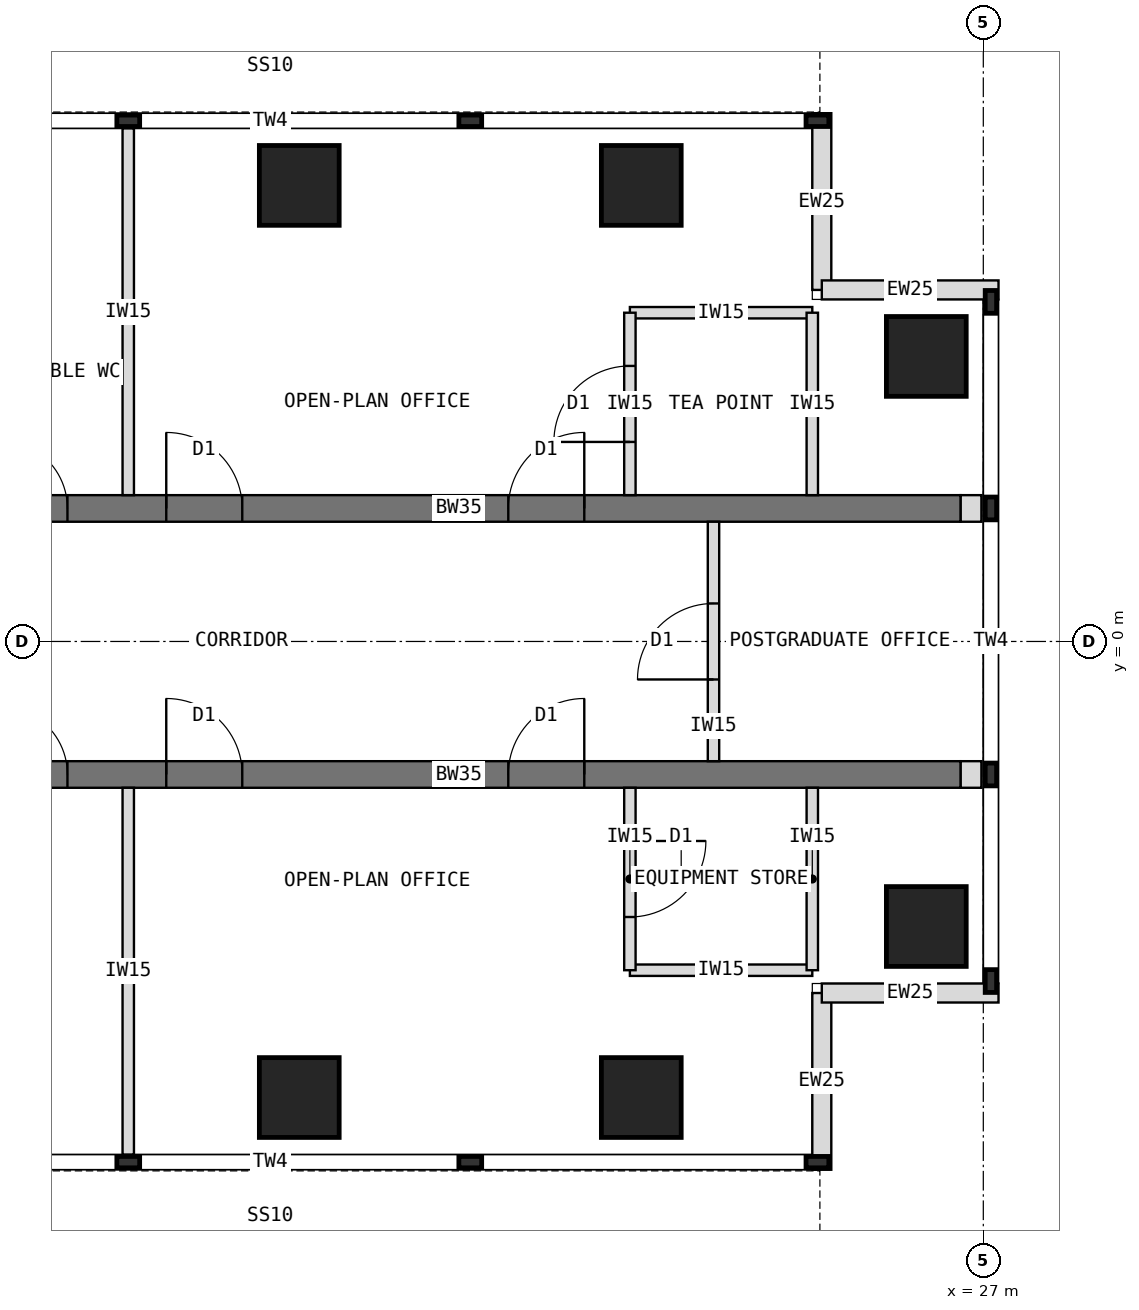
"""IFC4 building model, lengths in metres.
Left out: names, types, materials, properties, quantities, classifications, styles, units other than length and angle.
Written with IfcOpenShell. Run it as: python <this file> out.ifc"""

import sys

from ifc_helpers import new_model, si_unit, direction, frame, frame_2d, origin, origin_2d, place, context, subcontext, project, spatial, rectangle, extrude, element, fill, save


model = new_model("IFC4")
c1 = context("Model", 3, precision=1e-05, world=origin(), true_north=direction((0.0, 1.0)))
c2 = subcontext(c1, "Body", "Model", "MODEL_VIEW")
j1 = project(units=[si_unit("LENGTHUNIT", "METRE"), si_unit("PLANEANGLEUNIT", "RADIAN")], contexts=[c1])
p1 = place(None, origin())
s1 = spatial("IfcSite", under=j1, at=p1, CompositionType="ELEMENT")
p2 = place(p1, origin())
s2 = spatial("IfcBuilding", under=s1, at=p2, CompositionType="ELEMENT")
p3 = place(p2, frame((0.0, 0.0, 251.5)))
s3 = spatial("IfcBuildingStorey", under=s2, at=p3, CompositionType="ELEMENT", Elevation=251.5)
p4 = place(p3, frame((13.5, 1.75, 0.0), z_axis=(0.0, 0.0, 1.0), x_axis=(1.0, 0.0, 0.0)))
e1 = element("IfcWall", 1, at=p4, inside=s3, PredefinedType="SHEAR", context=c2, shape_type="SweptSolid", body=[
    extrude(rectangle(XDim=13.2, YDim=0.35, at=frame_2d((6.6, 0.0))), origin(), (0.0, 0.0, 1.0), 4.0),
])
p5 = place(p4, frame((0.55, 0.0, 0.0)))
e2 = element("IfcOpeningElement", 2, at=p5, cuts=e1, PredefinedType="OPENING", context=c2, shape_type="SweptSolid", body=[
    extrude(rectangle(XDim=0.9, YDim=2.1, at=frame_2d((0.45, 1.05))), frame((0.0, 0.185, 0.0), z_axis=(0.0, -1.0, 0.0), x_axis=(1.0, 0.0, 0.0)), (0.0, 0.0, 1.0), 0.37),
])
p6 = place(p4, frame((2.75, 0.0, 0.0)))
e3 = element("IfcOpeningElement", 3, at=p6, cuts=e1, PredefinedType="OPENING", context=c2, shape_type="SweptSolid", body=[
    extrude(rectangle(XDim=1.0, YDim=2.1, at=frame_2d((0.5, 1.05))), frame((0.0, 0.185, 0.0), z_axis=(0.0, -1.0, 0.0), x_axis=(1.0, 0.0, 0.0)), (0.0, 0.0, 1.0), 0.37),
])
p7 = place(p4, frame((7.25, 0.0, 0.0)))
e4 = element("IfcOpeningElement", 4, at=p7, cuts=e1, PredefinedType="OPENING", context=c2, shape_type="SweptSolid", body=[
    extrude(rectangle(XDim=1.0, YDim=2.1, at=frame_2d((0.5, 1.05))), frame((0.0, 0.185, 0.0), z_axis=(0.0, -1.0, 0.0), x_axis=(1.0, 0.0, 0.0)), (0.0, 0.0, 1.0), 0.37),
])
p8 = place(p3, frame((13.5, -1.75, 0.0), z_axis=(0.0, 0.0, 1.0), x_axis=(1.0, 0.0, 0.0)))
e5 = element("IfcWall", 5, at=p8, inside=s3, PredefinedType="SHEAR", context=c2, shape_type="SweptSolid", body=[
    extrude(rectangle(XDim=13.2, YDim=0.35, at=frame_2d((6.6, 0.0))), origin(), (0.0, 0.0, 1.0), 4.0),
])
p9 = place(p8, frame((0.55, 0.0, 0.0)))
e6 = element("IfcOpeningElement", 6, at=p9, cuts=e5, PredefinedType="OPENING", context=c2, shape_type="SweptSolid", body=[
    extrude(rectangle(XDim=0.9, YDim=2.1, at=frame_2d((0.45, 1.05))), frame((0.0, 0.185, 0.0), z_axis=(0.0, -1.0, 0.0), x_axis=(1.0, 0.0, 0.0)), (0.0, 0.0, 1.0), 0.37),
])
p10 = place(p8, frame((2.75, 0.0, 0.0)))
e7 = element("IfcOpeningElement", 7, at=p10, cuts=e5, PredefinedType="OPENING", context=c2, shape_type="SweptSolid", body=[
    extrude(rectangle(XDim=1.0, YDim=2.1, at=frame_2d((0.5, 1.05))), frame((0.0, 0.185, 0.0), z_axis=(0.0, -1.0, 0.0), x_axis=(1.0, 0.0, 0.0)), (0.0, 0.0, 1.0), 0.37),
])
p11 = place(p8, frame((7.25, 0.0, 0.0)))
e8 = element("IfcOpeningElement", 8, at=p11, cuts=e5, PredefinedType="OPENING", context=c2, shape_type="SweptSolid", body=[
    extrude(rectangle(XDim=1.0, YDim=2.1, at=frame_2d((0.5, 1.05))), frame((0.0, 0.185, 0.0), z_axis=(0.0, -1.0, 0.0), x_axis=(1.0, 0.0, 0.0)), (0.0, 0.0, 1.0), 0.37),
])
for number, where, z_axis, x_axis in (
    (9, (18.0, 6.0, 0.0), (0.0, 0.0, 1.0), (1.0, 0.0, 0.0)),
    (10, (18.0, -6.0, 0.0), (0.0, 0.0, 1.0), (1.0, 0.0, 0.0)),
    (11, (22.5, 6.0, 0.0), (0.0, 0.0, 1.0), (1.0, 0.0, 0.0)),
    (12, (22.5, -6.0, 0.0), (0.0, 0.0, 1.0), (1.0, 0.0, 0.0)),
    (13, (26.25, 3.75, 0.0), (0.0, 0.0, 1.0), (1.0, 0.0, 0.0)),
    (14, (26.25, -3.75, 0.0), (0.0, 0.0, 1.0), (1.0, 0.0, 0.0)),
):
    element("IfcColumn", number, at=place(p3, frame(where, z_axis=z_axis, x_axis=x_axis)), inside=s3, PredefinedType="COLUMN", context=c2, shape_type="SweptSolid", body=[
        extrude(rectangle(XDim=1.05, YDim=1.05, at=origin_2d()), origin(), (0.0, 0.0, 1.0), 4.0),
    ])
for number, where, z_axis, x_axis in (
    (15, (24.875, 6.95, 0.0), (0.0, 0.0, 1.0), (0.0, -1.0, 0.0)),
    (16, (24.875, 4.625, 0.0), (0.0, 0.0, 1.0), (1.0, 0.0, 0.0)),
    (17, (24.875, -6.95, 0.0), (0.0, 0.0, 1.0), (0.0, 1.0, 0.0)),
    (18, (24.875, -4.625, 0.0), (0.0, 0.0, 1.0), (1.0, 0.0, 0.0)),
):
    element("IfcWall", number, at=place(p3, frame(where, z_axis=z_axis, x_axis=x_axis)), inside=s3, PredefinedType="STANDARD", context=c2, shape_type="SweptSolid", body=[
        extrude(rectangle(XDim=2.325, YDim=0.25, at=frame_2d((1.163, 0.0))), origin(), (0.0, 0.0, 1.0), 3.8),
    ])
for number, where, z_axis, x_axis in (
    (19, (26.7, 1.75, 0.0), (0.0, 0.0, 1.0), (1.0, 0.0, 0.0)),
    (20, (26.7, -1.75, 0.0), (0.0, 0.0, 1.0), (1.0, 0.0, 0.0)),
):
    element("IfcWall", number, at=place(p3, frame(where, z_axis=z_axis, x_axis=x_axis)), inside=s3, PredefinedType="PARTITIONING", context=c2, shape_type="SweptSolid", body=[
        extrude(rectangle(XDim=0.275, YDim=0.35, at=frame_2d((0.138, 0.0))), origin(), (0.0, 0.0, 1.0), 3.8),
    ])
p12 = place(p3, frame((15.75, 1.925, 0.0), z_axis=(0.0, 0.0, 1.0), x_axis=(0.0, 1.0, 0.0)))
e21 = element("IfcWall", 21, at=p12, inside=s3, PredefinedType="PARTITIONING", context=c2, shape_type="SweptSolid", body=[
    extrude(rectangle(XDim=4.825, YDim=0.15, at=frame_2d((2.413, 0.0))), origin(), (0.0, 0.0, 1.0), 3.8),
])
p13 = place(p3, frame((22.35, 4.325, 0.0), z_axis=(0.0, 0.0, 1.0), x_axis=(1.0, 0.0, 0.0)))
e22 = element("IfcWall", 22, at=p13, inside=s3, PredefinedType="PARTITIONING", context=c2, shape_type="SweptSolid", body=[
    extrude(rectangle(XDim=2.4, YDim=0.15, at=frame_2d((1.2, 0.0))), origin(), (0.0, 0.0, 1.0), 3.8),
])
p14 = place(p3, frame((22.35, 1.925, 0.0), z_axis=(0.0, 0.0, 1.0), x_axis=(0.0, 1.0, 0.0)))
e23 = element("IfcWall", 23, at=p14, inside=s3, PredefinedType="PARTITIONING", context=c2, shape_type="SweptSolid", body=[
    extrude(rectangle(XDim=2.4, YDim=0.15, at=frame_2d((1.2, 0.0))), origin(), (0.0, 0.0, 1.0), 3.8),
])
p15 = place(p14, frame((0.7, 0.0, 0.0)))
e24 = element("IfcOpeningElement", 24, at=p15, cuts=e23, PredefinedType="OPENING", context=c2, shape_type="SweptSolid", body=[
    extrude(rectangle(XDim=1.0, YDim=2.1, at=frame_2d((0.5, 1.05))), frame((0.0, 0.085, 0.0), z_axis=(0.0, -1.0, 0.0), x_axis=(1.0, 0.0, 0.0)), (0.0, 0.0, 1.0), 0.17),
])
p16 = place(p3, frame((24.75, 1.925, 0.0), z_axis=(0.0, 0.0, 1.0), x_axis=(0.0, 1.0, 0.0)))
e25 = element("IfcWall", 25, at=p16, inside=s3, PredefinedType="PARTITIONING", context=c2, shape_type="SweptSolid", body=[
    extrude(rectangle(XDim=2.4, YDim=0.15, at=frame_2d((1.2, 0.0))), origin(), (0.0, 0.0, 1.0), 3.8),
])
p17 = place(p3, frame((15.75, -1.925, 0.0), z_axis=(0.0, 0.0, 1.0), x_axis=(0.0, -1.0, 0.0)))
e26 = element("IfcWall", 26, at=p17, inside=s3, PredefinedType="PARTITIONING", context=c2, shape_type="SweptSolid", body=[
    extrude(rectangle(XDim=4.825, YDim=0.15, at=frame_2d((2.413, 0.0))), origin(), (0.0, 0.0, 1.0), 3.8),
])
p18 = place(p3, frame((22.35, -4.325, 0.0), z_axis=(0.0, 0.0, 1.0), x_axis=(1.0, 0.0, 0.0)))
e27 = element("IfcWall", 27, at=p18, inside=s3, PredefinedType="PARTITIONING", context=c2, shape_type="SweptSolid", body=[
    extrude(rectangle(XDim=2.4, YDim=0.15, at=frame_2d((1.2, 0.0))), origin(), (0.0, 0.0, 1.0), 3.8),
])
p19 = place(p3, frame((22.35, -1.925, 0.0), z_axis=(0.0, 0.0, 1.0), x_axis=(0.0, -1.0, 0.0)))
e28 = element("IfcWall", 28, at=p19, inside=s3, PredefinedType="PARTITIONING", context=c2, shape_type="SweptSolid", body=[
    extrude(rectangle(XDim=2.4, YDim=0.15, at=frame_2d((1.2, 0.0))), origin(), (0.0, 0.0, 1.0), 3.8),
])
p20 = place(p19, frame((0.7, 0.0, 0.0)))
e29 = element("IfcOpeningElement", 29, at=p20, cuts=e28, PredefinedType="OPENING", context=c2, shape_type="SweptSolid", body=[
    extrude(rectangle(XDim=1.0, YDim=2.1, at=frame_2d((0.5, 1.05))), frame((0.0, 0.085, 0.0), z_axis=(0.0, -1.0, 0.0), x_axis=(1.0, 0.0, 0.0)), (0.0, 0.0, 1.0), 0.17),
])
p21 = place(p3, frame((24.75, -1.925, 0.0), z_axis=(0.0, 0.0, 1.0), x_axis=(0.0, -1.0, 0.0)))
e30 = element("IfcWall", 30, at=p21, inside=s3, PredefinedType="PARTITIONING", context=c2, shape_type="SweptSolid", body=[
    extrude(rectangle(XDim=2.4, YDim=0.15, at=frame_2d((1.2, 0.0))), origin(), (0.0, 0.0, 1.0), 3.8),
])
p22 = place(p3, frame((23.45, -1.575, 0.0), z_axis=(0.0, 0.0, 1.0), x_axis=(0.0, 1.0, 0.0)))
e31 = element("IfcWall", 31, at=p22, inside=s3, PredefinedType="PARTITIONING", context=c2, shape_type="SweptSolid", body=[
    extrude(rectangle(XDim=3.15, YDim=0.15, at=frame_2d((1.575, 0.0))), origin(), (0.0, 0.0, 1.0), 3.8),
])
p23 = place(p22, frame((1.075, 0.0, 0.0)))
e32 = element("IfcOpeningElement", 32, at=p23, cuts=e31, PredefinedType="OPENING", context=c2, shape_type="SweptSolid", body=[
    extrude(rectangle(XDim=1.0, YDim=2.1, at=frame_2d((0.5, 1.05))), frame((0.0, 0.085, 0.0), z_axis=(0.0, -1.0, 0.0), x_axis=(1.0, 0.0, 0.0)), (0.0, 0.0, 1.0), 0.17),
])
p24 = place(p15, origin())
e33 = element("IfcDoor", 33, at=p24, inside=s3, OperationType="SINGLE_SWING_LEFT", PredefinedType="DOOR", context=c2, shape_type="SweptSolid", body=[
    extrude(rectangle(XDim=1.0, YDim=2.1, at=frame_2d((0.5, 1.05))), frame((0.0, 0.025, 0.0), z_axis=(0.0, -1.0, 0.0), x_axis=(1.0, 0.0, 0.0)), (0.0, 0.0, 1.0), 0.05),
])
fill(e24, e33)
p25 = place(p20, origin())
e34 = element("IfcDoor", 34, at=p25, inside=s3, OperationType="SINGLE_SWING_LEFT", PredefinedType="DOOR", context=c2, shape_type="SweptSolid", body=[
    extrude(rectangle(XDim=1.0, YDim=2.1, at=frame_2d((0.5, 1.05))), frame((0.0, 0.025, 0.0), z_axis=(0.0, -1.0, 0.0), x_axis=(1.0, 0.0, 0.0)), (0.0, 0.0, 1.0), 0.05),
])
fill(e29, e34)
p26 = place(p23, origin())
e35 = element("IfcDoor", 35, at=p26, inside=s3, OperationType="SINGLE_SWING_LEFT", PredefinedType="DOOR", context=c2, shape_type="SweptSolid", body=[
    extrude(rectangle(XDim=1.0, YDim=2.1, at=frame_2d((0.5, 1.05))), frame((0.0, 0.025, 0.0), z_axis=(0.0, -1.0, 0.0), x_axis=(1.0, 0.0, 0.0)), (0.0, 0.0, 1.0), 0.05),
])
fill(e32, e35)
p27 = place(p5, origin())
e36 = element("IfcDoor", 36, at=p27, inside=s3, OperationType="SINGLE_SWING_LEFT", PredefinedType="DOOR", context=c2, shape_type="SweptSolid", body=[
    extrude(rectangle(XDim=0.9, YDim=2.1, at=frame_2d((0.45, 1.05))), frame((0.0, 0.025, 0.0), z_axis=(0.0, -1.0, 0.0), x_axis=(1.0, 0.0, 0.0)), (0.0, 0.0, 1.0), 0.05),
])
fill(e2, e36)
p28 = place(p6, origin())
e37 = element("IfcDoor", 37, at=p28, inside=s3, OperationType="SINGLE_SWING_LEFT", PredefinedType="DOOR", context=c2, shape_type="SweptSolid", body=[
    extrude(rectangle(XDim=1.0, YDim=2.1, at=frame_2d((0.5, 1.05))), frame((0.0, 0.025, 0.0), z_axis=(0.0, -1.0, 0.0), x_axis=(1.0, 0.0, 0.0)), (0.0, 0.0, 1.0), 0.05),
])
fill(e3, e37)
p29 = place(p7, origin())
e38 = element("IfcDoor", 38, at=p29, inside=s3, OperationType="SINGLE_SWING_RIGHT", PredefinedType="DOOR", context=c2, shape_type="SweptSolid", body=[
    extrude(rectangle(XDim=1.0, YDim=2.1, at=frame_2d((0.5, 1.05))), frame((0.0, 0.025, 0.0), z_axis=(0.0, -1.0, 0.0), x_axis=(1.0, 0.0, 0.0)), (0.0, 0.0, 1.0), 0.05),
])
fill(e4, e38)
p30 = place(p9, origin())
e39 = element("IfcDoor", 39, at=p30, inside=s3, OperationType="SINGLE_SWING_LEFT", PredefinedType="DOOR", context=c2, shape_type="SweptSolid", body=[
    extrude(rectangle(XDim=0.9, YDim=2.1, at=frame_2d((0.45, 1.05))), frame((0.0, 0.025, 0.0), z_axis=(0.0, -1.0, 0.0), x_axis=(1.0, 0.0, 0.0)), (0.0, 0.0, 1.0), 0.05),
])
fill(e6, e39)
p31 = place(p10, origin())
e40 = element("IfcDoor", 40, at=p31, inside=s3, OperationType="SINGLE_SWING_LEFT", PredefinedType="DOOR", context=c2, shape_type="SweptSolid", body=[
    extrude(rectangle(XDim=1.0, YDim=2.1, at=frame_2d((0.5, 1.05))), frame((0.0, 0.025, 0.0), z_axis=(0.0, -1.0, 0.0), x_axis=(1.0, 0.0, 0.0)), (0.0, 0.0, 1.0), 0.05),
])
fill(e7, e40)
p32 = place(p11, origin())
e41 = element("IfcDoor", 41, at=p32, inside=s3, OperationType="SINGLE_SWING_RIGHT", PredefinedType="DOOR", context=c2, shape_type="SweptSolid", body=[
    extrude(rectangle(XDim=1.0, YDim=2.1, at=frame_2d((0.5, 1.05))), frame((0.0, 0.025, 0.0), z_axis=(0.0, -1.0, 0.0), x_axis=(1.0, 0.0, 0.0)), (0.0, 0.0, 1.0), 0.05),
])
fill(e8, e41)
save(model, sys.argv[1])
